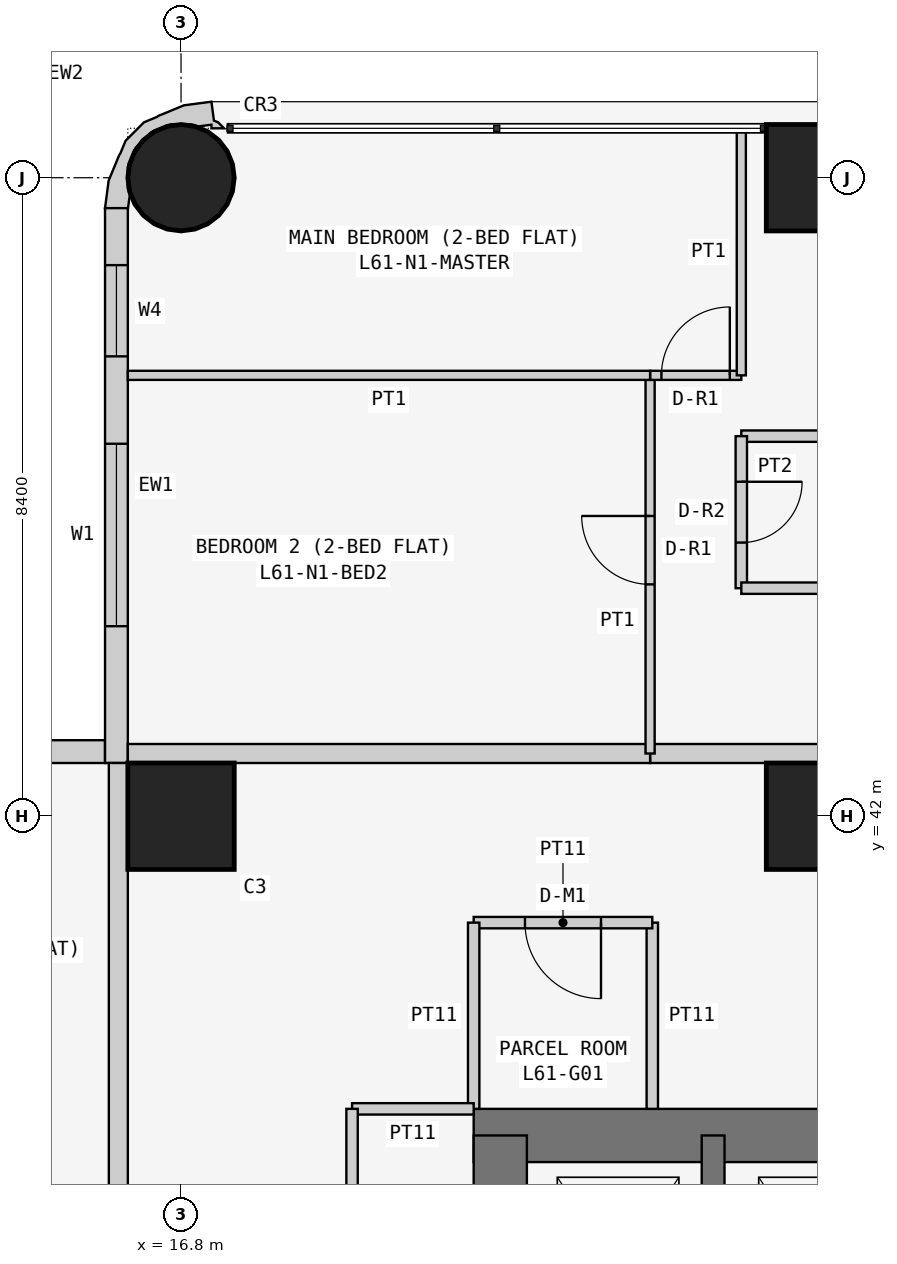
"""IFC4 building model, lengths in metres.
Left out: names, types, materials, properties, quantities, classifications, styles, units other than length and angle.
Written with IfcOpenShell. Run it as: python <this file> out.ifc"""

import sys

from ifc_helpers import new_model, si_unit, direction, frame, frame_2d, origin, origin_2d, place, context, subcontext, project, spatial, polyline, rectangle, circle, outline, extrude, element, fill, save


model = new_model("IFC4")
c1 = context("Model", 3, precision=1e-05, world=origin(), true_north=direction((0.0, 1.0)))
c2 = subcontext(c1, "Body", "Model", "MODEL_VIEW")
j1 = project(units=[si_unit("LENGTHUNIT", "METRE"), si_unit("PLANEANGLEUNIT", "RADIAN")], contexts=[c1])
p1 = place(None, origin())
s1 = spatial("IfcSite", under=j1, at=p1, CompositionType="ELEMENT")
p2 = place(p1, origin())
s2 = spatial("IfcBuilding", under=s1, at=p2, CompositionType="ELEMENT")
p3 = place(p2, frame((0.0, 0.0, 233.7)))
s3 = spatial("IfcBuildingStorey", under=s2, at=p3, CompositionType="ELEMENT", Elevation=233.7)
p4 = place(p3, frame((16.8, 42.0, 0.0), z_axis=(0.0, 0.0, 1.0), x_axis=(1.0, 0.0, 0.0)))
e1 = element("IfcColumn", 1, at=p4, inside=s3, PredefinedType="COLUMN", context=c2, shape_type="SweptSolid", body=[
    extrude(rectangle(XDim=1.4, YDim=1.4, at=origin_2d()), origin(), (0.0, 0.0, 1.0), 3.6),
])
p5 = place(p3, frame((16.8, 50.4, 0.0), z_axis=(0.0, 0.0, 1.0), x_axis=(1.0, 0.0, 0.0)))
e2 = element("IfcColumn", 2, at=p5, inside=s3, PredefinedType="COLUMN", context=c2, shape_type="SweptSolid", body=[
    extrude(circle(Radius=0.7, at=origin_2d()), origin(), (0.0, 0.0, 1.0), 3.6),
])
for number, where, z_axis, x_axis in (
    (3, (25.2, 42.0, 0.0), (0.0, 0.0, 1.0), (1.0, 0.0, 0.0)),
    (4, (25.2, 50.4, 0.0), (0.0, 0.0, 1.0), (1.0, 0.0, 0.0)),
):
    element("IfcColumn", number, at=place(p3, frame(where, z_axis=z_axis, x_axis=x_axis)), inside=s3, PredefinedType="COLUMN", context=c2, shape_type="SweptSolid", body=[
        extrude(rectangle(XDim=1.4, YDim=1.4, at=origin_2d()), origin(), (0.0, 0.0, 1.0), 3.6),
    ])
p6 = place(p3, frame((37.8, 37.8, 0.0), z_axis=(0.0, 0.0, 1.0), x_axis=(-1.0, 0.0, 0.0)))
e5 = element("IfcWall", 5, at=p6, inside=s3, PredefinedType="SHEAR", context=c2, shape_type="SweptSolid", body=[
    extrude(rectangle(XDim=17.15, YDim=0.7, at=frame_2d((8.575, 0.0))), origin(), (0.0, 0.0, 1.0), 3.6),
])
p7 = place(p3, frame((21.0, 37.8, 0.0), z_axis=(0.0, 0.0, 1.0), x_axis=(0.0, -1.0, 0.0)))
e6 = element("IfcWall", 6, at=p7, inside=s3, PredefinedType="SHEAR", context=c2, shape_type="SweptSolid", body=[
    extrude(rectangle(XDim=17.15, YDim=0.7, at=frame_2d((8.575, 0.0))), origin(), (0.0, 0.0, 1.0), 3.6),
])
p8 = place(p7, frame((5.4, 0.0, 0.0)))
e7 = element("IfcOpeningElement", 7, at=p8, cuts=e6, PredefinedType="OPENING", context=c2, shape_type="SweptSolid", body=[
    extrude(rectangle(XDim=1.2, YDim=2.1, at=frame_2d((0.6, 1.05))), frame((0.0, 0.36, 0.0), z_axis=(0.0, -1.0, 0.0), x_axis=(1.0, 0.0, 0.0)), (0.0, 0.0, 1.0), 0.72),
])
p9 = place(p3, frame((23.8, 34.6, 0.0), z_axis=(0.0, 0.0, 1.0), x_axis=(0.0, 1.0, 0.0)))
e8 = element("IfcWall", 8, at=p9, inside=s3, PredefinedType="SHEAR", context=c2, shape_type="SweptSolid", body=[
    extrude(rectangle(XDim=3.2, YDim=0.3, at=frame_2d((1.6, 0.0))), origin(), (0.0, 0.0, 1.0), 3.6),
])
p10 = place(p3, frame((15.8, 42.85, 0.0), z_axis=(0.0, 0.0, 1.0), x_axis=(-1.0, 0.0, 0.0)))
e9 = element("IfcWall", 9, at=p10, inside=s3, PredefinedType="SOLIDWALL", context=c2, shape_type="SweptSolid", body=[
    extrude(rectangle(XDim=15.4, YDim=0.3, at=frame_2d((7.7, 0.0))), origin(), (0.0, 0.0, 1.0), 3.45),
])
p11 = place(p10, frame((1.2, 0.0, 0.9)))
e10 = element("IfcOpeningElement", 10, at=p11, cuts=e9, PredefinedType="OPENING", context=c2, shape_type="SweptSolid", body=[
    extrude(rectangle(XDim=1.8, YDim=1.5, at=frame_2d((0.9, 0.75))), frame((0.0, 0.16, 0.0), z_axis=(0.0, -1.0, 0.0), x_axis=(1.0, 0.0, 0.0)), (0.0, 0.0, 1.0), 0.32),
])
p12 = place(p10, frame((4.95, 0.0, 1.5)))
e11 = element("IfcOpeningElement", 11, at=p12, cuts=e9, PredefinedType="OPENING", context=c2, shape_type="SweptSolid", body=[
    extrude(rectangle(XDim=0.9, YDim=0.7, at=frame_2d((0.45, 0.35))), frame((0.0, 0.16, 0.0), z_axis=(0.0, -1.0, 0.0), x_axis=(1.0, 0.0, 0.0)), (0.0, 0.0, 1.0), 0.32),
])
p13 = place(p10, frame((8.5, 0.0, 0.9)))
e12 = element("IfcOpeningElement", 12, at=p13, cuts=e9, PredefinedType="OPENING", context=c2, shape_type="SweptSolid", body=[
    extrude(rectangle(XDim=1.8, YDim=1.5, at=frame_2d((0.9, 0.75))), frame((0.0, 0.16, 0.0), z_axis=(0.0, -1.0, 0.0), x_axis=(1.0, 0.0, 0.0)), (0.0, 0.0, 1.0), 0.32),
])
p14 = place(p10, frame((12.5, 0.0, 0.0)))
e13 = element("IfcOpeningElement", 13, at=p14, cuts=e9, PredefinedType="OPENING", context=c2, shape_type="SweptSolid", body=[
    extrude(rectangle(XDim=0.9, YDim=2.4, at=frame_2d((0.45, 1.2))), frame((0.0, 0.16, 0.0), z_axis=(0.0, -1.0, 0.0), x_axis=(1.0, 0.0, 0.0)), (0.0, 0.0, 1.0), 0.32),
])
p15 = place(p10, frame((13.5, 0.0, 0.9)))
e14 = element("IfcOpeningElement", 14, at=p15, cuts=e9, PredefinedType="OPENING", context=c2, shape_type="SweptSolid", body=[
    extrude(rectangle(XDim=1.2, YDim=1.5, at=frame_2d((0.6, 0.75))), frame((0.0, 0.16, 0.0), z_axis=(0.0, -1.0, 0.0), x_axis=(1.0, 0.0, 0.0)), (0.0, 0.0, 1.0), 0.32),
])
p16 = place(p3, frame((15.95, 50.0, 0.0), z_axis=(0.0, 0.0, 1.0), x_axis=(0.0, -1.0, 0.0)))
e15 = element("IfcWall", 15, at=p16, inside=s3, PredefinedType="SOLIDWALL", context=c2, shape_type="SweptSolid", body=[
    extrude(rectangle(XDim=7.3, YDim=0.3, at=frame_2d((3.65, 0.0))), origin(), (0.0, 0.0, 1.0), 3.45),
])
p17 = place(p16, frame((3.1, 0.0, 0.9)))
e16 = element("IfcOpeningElement", 16, at=p17, cuts=e15, PredefinedType="OPENING", context=c2, shape_type="SweptSolid", body=[
    extrude(rectangle(XDim=2.4, YDim=1.5, at=frame_2d((1.2, 0.75))), frame((0.0, 0.16, 0.0), z_axis=(0.0, -1.0, 0.0), x_axis=(1.0, 0.0, 0.0)), (0.0, 0.0, 1.0), 0.32),
])
p18 = place(p16, frame((0.75, 0.0, 0.9)))
e17 = element("IfcOpeningElement", 17, at=p18, cuts=e15, PredefinedType="OPENING", context=c2, shape_type="SweptSolid", body=[
    extrude(rectangle(XDim=1.2, YDim=1.5, at=frame_2d((0.6, 0.75))), frame((0.0, 0.16, 0.0), z_axis=(0.0, -1.0, 0.0), x_axis=(1.0, 0.0, 0.0)), (0.0, 0.0, 1.0), 0.32),
])
p19 = place(p3, frame((17.312, 50.988, 0.0), z_axis=(0.0, 0.0, 1.0), x_axis=(-0.439933741929, 0.898030234854, 0.0)))
e18 = element("IfcWall", 18, at=p19, inside=s3, PredefinedType="SOLIDWALL", context=c2, shape_type="SweptSolid", body=[
    extrude(outline(polyline([(0.138, -0.039), (0.182, -0.0), (0.419, -0.08), (0.536, 0.266), (0.559, 0.631), (0.555, 0.651), (0.566, 0.836), (0.456, 1.159), (0.333, 1.298), (0.324, 1.316), (0.082, 1.591), (-0.222, 1.793), (-0.39, 1.541), (-0.372, 1.532), (-0.195, 1.414), (-0.12, 1.41), (0.131, 1.287), (0.315, 1.078), (0.406, 0.814), (0.388, 0.536), (0.265, 0.285), (0.209, 0.236), (0.148, 0.053), (0.105, 0.074), (0.032, -0.076), (0.138, -0.039)])), origin(), (0.0, 0.0, 1.0), 3.45),
])
p20 = place(p3, frame((23.0, 38.15, 0.0), z_axis=(0.0, 0.0, 1.0), x_axis=(0.0, 1.0, 0.0)))
e19 = element("IfcWall", 19, at=p20, inside=s3, PredefinedType="PARTITIONING", context=c2, shape_type="SweptSolid", body=[
    extrude(rectangle(XDim=2.45, YDim=0.15, at=frame_2d((1.225, 0.0))), origin(), (0.0, 0.0, 1.0), 3.45),
])
p21 = place(p3, frame((23.0, 40.6, 0.0), z_axis=(0.0, 0.0, 1.0), x_axis=(-1.0, 0.0, 0.0)))
e20 = element("IfcWall", 20, at=p21, inside=s3, PredefinedType="PARTITIONING", context=c2, shape_type="SweptSolid", body=[
    extrude(rectangle(XDim=2.35, YDim=0.15, at=frame_2d((1.175, 0.0))), origin(), (0.0, 0.0, 1.0), 3.45),
])
p22 = place(p21, frame((0.675, 0.0, 0.0)))
e21 = element("IfcOpeningElement", 21, at=p22, cuts=e20, PredefinedType="OPENING", context=c2, shape_type="SweptSolid", body=[
    extrude(rectangle(XDim=1.0, YDim=2.1, at=frame_2d((0.5, 1.05))), frame((0.0, 0.085, 0.0), z_axis=(0.0, -1.0, 0.0), x_axis=(1.0, 0.0, 0.0)), (0.0, 0.0, 1.0), 0.17),
])
p23 = place(p3, frame((20.65, 40.6, 0.0), z_axis=(0.0, 0.0, 1.0), x_axis=(0.0, -1.0, 0.0)))
e22 = element("IfcWall", 22, at=p23, inside=s3, PredefinedType="PARTITIONING", context=c2, shape_type="SweptSolid", body=[
    extrude(rectangle(XDim=2.45, YDim=0.15, at=frame_2d((1.225, 0.0))), origin(), (0.0, 0.0, 1.0), 3.45),
])
p24 = place(p3, frame((20.65, 38.15, 0.0), z_axis=(0.0, 0.0, 1.0), x_axis=(-1.0, 0.0, 0.0)))
e23 = element("IfcWall", 23, at=p24, inside=s3, PredefinedType="PARTITIONING", context=c2, shape_type="SweptSolid", body=[
    extrude(rectangle(XDim=1.6, YDim=0.15, at=frame_2d((0.8, 0.0))), origin(), (0.0, 0.0, 1.0), 3.45),
])
p25 = place(p3, frame((19.05, 38.15, 0.0), z_axis=(0.0, 0.0, 1.0), x_axis=(0.0, -1.0, 0.0)))
e24 = element("IfcWall", 24, at=p25, inside=s3, PredefinedType="PARTITIONING", context=c2, shape_type="SweptSolid", body=[
    extrude(rectangle(XDim=3.55, YDim=0.15, at=frame_2d((1.775, 0.0))), origin(), (0.0, 0.0, 1.0), 3.45),
])
p26 = place(p25, frame((1.275, 0.0, 0.0)))
e25 = element("IfcOpeningElement", 25, at=p26, cuts=e24, PredefinedType="OPENING", context=c2, shape_type="SweptSolid", body=[
    extrude(rectangle(XDim=1.0, YDim=2.1, at=frame_2d((0.5, 1.05))), frame((0.0, 0.085, 0.0), z_axis=(0.0, -1.0, 0.0), x_axis=(1.0, 0.0, 0.0)), (0.0, 0.0, 1.0), 0.17),
])
p27 = place(p3, frame((22.971, 42.825, 0.0), z_axis=(0.0, 0.0, 1.0), x_axis=(1.0, 0.0, 0.0)))
e26 = element("IfcWall", 26, at=p27, inside=s3, PredefinedType="PARTITIONING", context=c2, shape_type="SweptSolid", body=[
    extrude(rectangle(XDim=6.429, YDim=0.25, at=frame_2d((3.214, 0.0))), origin(), (0.0, 0.0, 1.0), 3.45),
])
p28 = place(p27, frame((4.929, 0.0, 0.0)))
e27 = element("IfcOpeningElement", 27, at=p28, cuts=e26, PredefinedType="OPENING", context=c2, shape_type="SweptSolid", body=[
    extrude(rectangle(XDim=1.0, YDim=2.1, at=frame_2d((0.5, 1.05))), frame((0.0, 0.135, 0.0), z_axis=(0.0, -1.0, 0.0), x_axis=(1.0, 0.0, 0.0)), (0.0, 0.0, 1.0), 0.27),
])
p29 = place(p3, frame((16.1, 42.825, 0.0), z_axis=(0.0, 0.0, 1.0), x_axis=(1.0, 0.0, 0.0)))
e28 = element("IfcWall", 28, at=p29, inside=s3, PredefinedType="PARTITIONING", context=c2, shape_type="SweptSolid", body=[
    extrude(rectangle(XDim=6.871, YDim=0.25, at=frame_2d((3.436, 0.0))), origin(), (0.0, 0.0, 1.0), 3.45),
])
p30 = place(p3, frame((15.975, 36.229, 0.0), z_axis=(0.0, 0.0, 1.0), x_axis=(0.0, 1.0, 0.0)))
e29 = element("IfcWall", 29, at=p30, inside=s3, PredefinedType="PARTITIONING", context=c2, shape_type="SweptSolid", body=[
    extrude(rectangle(XDim=6.471, YDim=0.25, at=frame_2d((3.235, 0.0))), origin(), (0.0, 0.0, 1.0), 3.45),
])
p31 = place(p3, frame((29.4, 47.0, 0.0), z_axis=(0.0, 0.0, 1.0), x_axis=(-1.0, 0.0, 0.0)))
e30 = element("IfcWall", 30, at=p31, inside=s3, PredefinedType="PARTITIONING", context=c2, shape_type="SweptSolid", body=[
    extrude(rectangle(XDim=5.229, YDim=0.15, at=frame_2d((2.615, 0.0))), origin(), (0.0, 0.0, 1.0), 3.45),
])
p32 = place(p3, frame((24.171, 47.0, 0.0), z_axis=(0.0, 0.0, 1.0), x_axis=(0.0, -1.0, 0.0)))
e31 = element("IfcWall", 31, at=p32, inside=s3, PredefinedType="PARTITIONING", context=c2, shape_type="SweptSolid", body=[
    extrude(rectangle(XDim=2.0, YDim=0.15, at=frame_2d((1.0, 0.0))), origin(), (0.0, 0.0, 1.0), 3.45),
])
p33 = place(p32, frame((0.6, 0.0, 0.0)))
e32 = element("IfcOpeningElement", 32, at=p33, cuts=e31, PredefinedType="OPENING", context=c2, shape_type="SweptSolid", body=[
    extrude(rectangle(XDim=0.8, YDim=2.1, at=frame_2d((0.4, 1.05))), frame((0.0, 0.085, 0.0), z_axis=(0.0, -1.0, 0.0), x_axis=(1.0, 0.0, 0.0)), (0.0, 0.0, 1.0), 0.17),
])
p34 = place(p3, frame((24.171, 45.0, 0.0), z_axis=(0.0, 0.0, 1.0), x_axis=(1.0, 0.0, 0.0)))
e33 = element("IfcWall", 33, at=p34, inside=s3, PredefinedType="PARTITIONING", context=c2, shape_type="SweptSolid", body=[
    extrude(rectangle(XDim=5.229, YDim=0.15, at=frame_2d((2.615, 0.0))), origin(), (0.0, 0.0, 1.0), 3.45),
])
p35 = place(p3, frame((22.971, 42.825, 0.0), z_axis=(0.0, 0.0, 1.0), x_axis=(0.0, 1.0, 0.0)))
e34 = element("IfcWall", 34, at=p35, inside=s3, PredefinedType="PARTITIONING", context=c2, shape_type="SweptSolid", body=[
    extrude(rectangle(XDim=4.975, YDim=0.12, at=frame_2d((2.488, 0.0))), origin(), (0.0, 0.0, 1.0), 3.45),
])
p36 = place(p35, frame((2.225, 0.0, 0.0)))
e35 = element("IfcOpeningElement", 35, at=p36, cuts=e34, PredefinedType="OPENING", context=c2, shape_type="SweptSolid", body=[
    extrude(rectangle(XDim=0.9, YDim=2.1, at=frame_2d((0.45, 1.05))), frame((0.0, 0.07, 0.0), z_axis=(0.0, -1.0, 0.0), x_axis=(1.0, 0.0, 0.0)), (0.0, 0.0, 1.0), 0.14),
])
p37 = place(p3, frame((22.971, 47.8, 0.0), z_axis=(0.0, 0.0, 1.0), x_axis=(1.0, 0.0, 0.0)))
e36 = element("IfcWall", 36, at=p37, inside=s3, PredefinedType="PARTITIONING", context=c2, shape_type="SweptSolid", body=[
    extrude(rectangle(XDim=1.2, YDim=0.12, at=frame_2d((0.6, 0.0))), origin(), (0.0, 0.0, 1.0), 3.45),
])
p38 = place(p37, frame((0.149, 0.0, 0.0)))
e37 = element("IfcOpeningElement", 37, at=p38, cuts=e36, PredefinedType="OPENING", context=c2, shape_type="SweptSolid", body=[
    extrude(rectangle(XDim=0.9, YDim=2.1, at=frame_2d((0.45, 1.05))), frame((0.0, 0.07, 0.0), z_axis=(0.0, -1.0, 0.0), x_axis=(1.0, 0.0, 0.0)), (0.0, 0.0, 1.0), 0.14),
])
p39 = place(p3, frame((24.171, 47.8, 0.0), z_axis=(0.0, 0.0, 1.0), x_axis=(0.0, 1.0, 0.0)))
e38 = element("IfcWall", 38, at=p39, inside=s3, PredefinedType="PARTITIONING", context=c2, shape_type="SweptSolid", body=[
    extrude(rectangle(XDim=3.25, YDim=0.12, at=frame_2d((1.625, 0.0))), origin(), (0.0, 0.0, 1.0), 3.45),
])
p40 = place(p3, frame((22.971, 47.8, 0.0), z_axis=(0.0, 0.0, 1.0), x_axis=(-1.0, 0.0, 0.0)))
e39 = element("IfcWall", 39, at=p40, inside=s3, PredefinedType="PARTITIONING", context=c2, shape_type="SweptSolid", body=[
    extrude(rectangle(XDim=6.871, YDim=0.12, at=frame_2d((3.436, 0.0))), origin(), (0.0, 0.0, 1.0), 3.45),
])
p41 = place(p17, origin())
e40 = element("IfcWindow", 40, at=p41, inside=s3, PartitioningType="SINGLE_PANEL", PredefinedType="WINDOW", context=c2, shape_type="SweptSolid", body=[
    extrude(rectangle(XDim=2.4, YDim=1.5, at=frame_2d((1.2, 0.75))), frame((0.0, 0.03, 0.0), z_axis=(0.0, -1.0, 0.0), x_axis=(1.0, 0.0, 0.0)), (0.0, 0.0, 1.0), 0.06),
])
fill(e16, e40)
p42 = place(p18, origin())
e41 = element("IfcWindow", 41, at=p42, inside=s3, PartitioningType="SINGLE_PANEL", PredefinedType="WINDOW", context=c2, shape_type="SweptSolid", body=[
    extrude(rectangle(XDim=1.2, YDim=1.5, at=frame_2d((0.6, 0.75))), frame((0.0, 0.03, 0.0), z_axis=(0.0, -1.0, 0.0), x_axis=(1.0, 0.0, 0.0)), (0.0, 0.0, 1.0), 0.06),
])
fill(e17, e41)
p43 = place(p22, origin())
e42 = element("IfcDoor", 42, at=p43, inside=s3, OperationType="SINGLE_SWING_LEFT", PredefinedType="DOOR", context=c2, shape_type="SweptSolid", body=[
    extrude(rectangle(XDim=1.0, YDim=2.1, at=frame_2d((0.5, 1.05))), frame((0.0, 0.025, 0.0), z_axis=(0.0, -1.0, 0.0), x_axis=(1.0, 0.0, 0.0)), (0.0, 0.0, 1.0), 0.05),
])
fill(e21, e42)
p44 = place(p33, origin())
e43 = element("IfcDoor", 43, at=p44, inside=s3, OperationType="SINGLE_SWING_LEFT", PredefinedType="DOOR", context=c2, shape_type="SweptSolid", body=[
    extrude(rectangle(XDim=0.8, YDim=2.1, at=frame_2d((0.4, 1.05))), frame((0.0, 0.025, 0.0), z_axis=(0.0, -1.0, 0.0), x_axis=(1.0, 0.0, 0.0)), (0.0, 0.0, 1.0), 0.05),
])
fill(e32, e43)
p45 = place(p36, origin())
e44 = element("IfcDoor", 44, at=p45, inside=s3, OperationType="SINGLE_SWING_RIGHT", PredefinedType="DOOR", context=c2, shape_type="SweptSolid", body=[
    extrude(rectangle(XDim=0.9, YDim=2.1, at=frame_2d((0.45, 1.05))), frame((0.0, 0.025, 0.0), z_axis=(0.0, -1.0, 0.0), x_axis=(1.0, 0.0, 0.0)), (0.0, 0.0, 1.0), 0.05),
])
fill(e35, e44)
p46 = place(p38, origin())
e45 = element("IfcDoor", 45, at=p46, inside=s3, OperationType="SINGLE_SWING_RIGHT", PredefinedType="DOOR", context=c2, shape_type="SweptSolid", body=[
    extrude(rectangle(XDim=0.9, YDim=2.1, at=frame_2d((0.45, 1.05))), frame((0.0, 0.025, 0.0), z_axis=(0.0, -1.0, 0.0), x_axis=(1.0, 0.0, 0.0)), (0.0, 0.0, 1.0), 0.05),
])
fill(e37, e45)
save(model, sys.argv[1])
